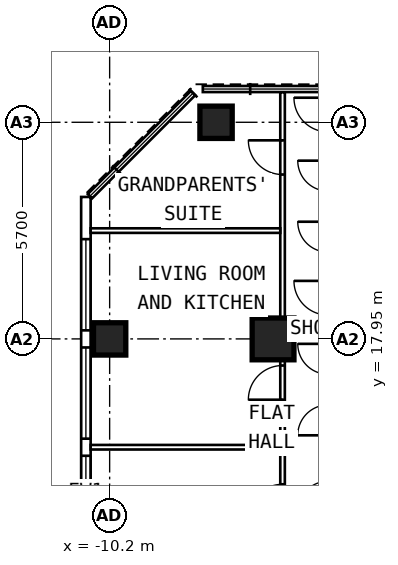
"""IFC4 building model, lengths in metres.
Left out: names, types, materials, properties, quantities, classifications, styles, units other than length and angle.
Written with IfcOpenShell. Run it as: python <this file> out.ifc"""

import sys

from ifc_helpers import new_model, si_unit, direction, frame, frame_2d, origin, origin_2d, place, context, subcontext, project, spatial, rectangle, extrude, element, fill, save


model = new_model("IFC4")
c1 = context("Model", 3, precision=1e-05, world=origin(), true_north=direction((0.0, 1.0)))
c2 = subcontext(c1, "Body", "Model", "MODEL_VIEW")
j1 = project(units=[si_unit("LENGTHUNIT", "METRE"), si_unit("PLANEANGLEUNIT", "RADIAN")], contexts=[c1])
p1 = place(None, origin())
s1 = spatial("IfcSite", under=j1, at=p1, CompositionType="ELEMENT")
p2 = place(p1, origin())
s2 = spatial("IfcBuilding", under=s1, at=p2, CompositionType="ELEMENT")
p3 = place(p2, frame((0.0, 0.0, 238.8)))
s3 = spatial("IfcBuildingStorey", under=s2, at=p3, CompositionType="ELEMENT", Elevation=238.8)
for number, where, z_axis, x_axis in (
    (1, (-10.2, 17.95, 0.0), (0.0, 0.0, 1.0), (0.0, 1.0, 0.0)),
    (2, (-7.4, 23.65, 0.0), (0.0, 0.0, 1.0), (0.0, 1.0, 0.0)),
):
    element("IfcColumn", number, at=place(p3, frame(where, z_axis=z_axis, x_axis=x_axis)), inside=s3, PredefinedType="COLUMN", context=c2, shape_type="SweptSolid", body=[
        extrude(rectangle(XDim=0.85, YDim=0.85, at=origin_2d()), origin(), (0.0, 0.0, 1.0), 3.6),
    ])
p4 = place(p3, frame((-5.9, 17.95, 0.0), z_axis=(0.0, 0.0, 1.0), x_axis=(0.0, 1.0, 0.0)))
e3 = element("IfcColumn", 3, at=p4, inside=s3, PredefinedType="COLUMN", context=c2, shape_type="SweptSolid", body=[
    extrude(rectangle(XDim=1.1, YDim=1.1, at=origin_2d()), origin(), (0.0, 0.0, 1.0), 3.6),
])
p5 = place(p3, frame((-10.825, 6.148, 0.0), z_axis=(0.0, 0.0, 1.0), x_axis=(0.0, 1.0, 0.0)))
e4 = element("IfcWall", 4, at=p5, inside=s3, PredefinedType="SOLIDWALL", context=c2, shape_type="SweptSolid", body=[
    extrude(rectangle(XDim=15.537, YDim=0.25, at=frame_2d((7.769, 0.0))), origin(), (0.0, 0.0, 1.0), 3.35),
])
p6 = place(p5, frame((0.627, 0.0, 0.8)))
e5 = element("IfcOpeningElement", 5, at=p6, cuts=e4, PredefinedType="OPENING", context=c2, shape_type="SweptSolid", body=[
    extrude(rectangle(XDim=2.4, YDim=1.8, at=frame_2d((1.2, 0.9))), frame((0.0, 0.137, 0.0), z_axis=(0.0, -1.0, 0.0), x_axis=(1.0, 0.0, 0.0)), (0.0, 0.0, 1.0), 0.274),
])
p7 = place(p5, frame((3.477, 0.0, 0.8)))
e6 = element("IfcOpeningElement", 6, at=p7, cuts=e4, PredefinedType="OPENING", context=c2, shape_type="SweptSolid", body=[
    extrude(rectangle(XDim=2.4, YDim=1.8, at=frame_2d((1.2, 0.9))), frame((0.0, 0.137, 0.0), z_axis=(0.0, -1.0, 0.0), x_axis=(1.0, 0.0, 0.0)), (0.0, 0.0, 1.0), 0.274),
])
p8 = place(p5, frame((6.327, 0.0, 0.8)))
e7 = element("IfcOpeningElement", 7, at=p8, cuts=e4, PredefinedType="OPENING", context=c2, shape_type="SweptSolid", body=[
    extrude(rectangle(XDim=2.4, YDim=1.8, at=frame_2d((1.2, 0.9))), frame((0.0, 0.137, 0.0), z_axis=(0.0, -1.0, 0.0), x_axis=(1.0, 0.0, 0.0)), (0.0, 0.0, 1.0), 0.274),
])
p9 = place(p5, frame((9.177, 0.0, 0.8)))
e8 = element("IfcOpeningElement", 8, at=p9, cuts=e4, PredefinedType="OPENING", context=c2, shape_type="SweptSolid", body=[
    extrude(rectangle(XDim=2.4, YDim=1.8, at=frame_2d((1.2, 0.9))), frame((0.0, 0.137, 0.0), z_axis=(0.0, -1.0, 0.0), x_axis=(1.0, 0.0, 0.0)), (0.0, 0.0, 1.0), 0.274),
])
p10 = place(p5, frame((12.027, 0.0, 0.8)))
e9 = element("IfcOpeningElement", 9, at=p10, cuts=e4, PredefinedType="OPENING", context=c2, shape_type="SweptSolid", body=[
    extrude(rectangle(XDim=2.4, YDim=1.8, at=frame_2d((1.2, 0.9))), frame((0.0, 0.137, 0.0), z_axis=(0.0, -1.0, 0.0), x_axis=(1.0, 0.0, 0.0)), (0.0, 0.0, 1.0), 0.274),
])
p11 = place(p3, frame((-5.65, 9.6, 0.0), z_axis=(0.0, 0.0, 1.0), x_axis=(0.0, 1.0, 0.0)))
e10 = element("IfcWall", 10, at=p11, inside=s3, PredefinedType="PARTITIONING", context=c2, shape_type="SweptSolid", body=[
    extrude(rectangle(XDim=14.845, YDim=0.12, at=frame_2d((7.422, 0.0))), origin(), (0.0, 0.0, 1.0), 3.35),
])
p12 = place(p11, frame((1.05, 0.0, 0.0)))
e11 = element("IfcOpeningElement", 11, at=p12, cuts=e10, PredefinedType="OPENING", context=c2, shape_type="SweptSolid", body=[
    extrude(rectangle(XDim=0.9, YDim=2.1, at=frame_2d((0.45, 1.05))), frame((0.0, 0.072, 0.0), z_axis=(0.0, -1.0, 0.0), x_axis=(1.0, 0.0, 0.0)), (0.0, 0.0, 1.0), 0.144),
])
p13 = place(p11, frame((3.625, 0.0, 0.0)))
e12 = element("IfcOpeningElement", 12, at=p13, cuts=e10, PredefinedType="OPENING", context=c2, shape_type="SweptSolid", body=[
    extrude(rectangle(XDim=0.9, YDim=2.1, at=frame_2d((0.45, 1.05))), frame((0.0, 0.072, 0.0), z_axis=(0.0, -1.0, 0.0), x_axis=(1.0, 0.0, 0.0)), (0.0, 0.0, 1.0), 0.144),
])
p14 = place(p11, frame((6.75, 0.0, 0.0)))
e13 = element("IfcOpeningElement", 13, at=p14, cuts=e10, PredefinedType="OPENING", context=c2, shape_type="SweptSolid", body=[
    extrude(rectangle(XDim=0.9, YDim=2.1, at=frame_2d((0.45, 1.05))), frame((0.0, 0.072, 0.0), z_axis=(0.0, -1.0, 0.0), x_axis=(1.0, 0.0, 0.0)), (0.0, 0.0, 1.0), 0.144),
])
p15 = place(p11, frame((12.675, 0.0, 0.0)))
e14 = element("IfcOpeningElement", 14, at=p15, cuts=e10, PredefinedType="OPENING", context=c2, shape_type="SweptSolid", body=[
    extrude(rectangle(XDim=0.9, YDim=2.1, at=frame_2d((0.45, 1.05))), frame((0.0, 0.072, 0.0), z_axis=(0.0, -1.0, 0.0), x_axis=(1.0, 0.0, 0.0)), (0.0, 0.0, 1.0), 0.144),
])
for number, where, z_axis, x_axis in (
    (15, (-5.71, 15.1, 0.0), (0.0, 0.0, 1.0), (-1.0, 0.0, 0.0)),
    (16, (-5.71, 20.8, 0.0), (0.0, 0.0, 1.0), (-1.0, 0.0, 0.0)),
):
    element("IfcWall", number, at=place(p3, frame(where, z_axis=z_axis, x_axis=x_axis)), inside=s3, PredefinedType="PARTITIONING", context=c2, shape_type="SweptSolid", body=[
        extrude(rectangle(XDim=4.99, YDim=0.12, at=frame_2d((2.495, 0.0))), origin(), (0.0, 0.0, 1.0), 3.35),
    ])
p16 = place(p8, origin())
e17 = element("IfcWindow", 17, at=p16, inside=s3, PartitioningType="SINGLE_PANEL", PredefinedType="WINDOW", context=c2, shape_type="SweptSolid", body=[
    extrude(rectangle(XDim=2.4, YDim=1.8, at=frame_2d((1.2, 0.9))), frame((0.0, 0.03, 0.0), z_axis=(0.0, -1.0, 0.0), x_axis=(1.0, 0.0, 0.0)), (0.0, 0.0, 1.0), 0.06),
])
fill(e7, e17)
p17 = place(p9, origin())
e18 = element("IfcWindow", 18, at=p17, inside=s3, PartitioningType="SINGLE_PANEL", PredefinedType="WINDOW", context=c2, shape_type="SweptSolid", body=[
    extrude(rectangle(XDim=2.4, YDim=1.8, at=frame_2d((1.2, 0.9))), frame((0.0, 0.03, 0.0), z_axis=(0.0, -1.0, 0.0), x_axis=(1.0, 0.0, 0.0)), (0.0, 0.0, 1.0), 0.06),
])
fill(e8, e18)
p18 = place(p10, origin())
e19 = element("IfcWindow", 19, at=p18, inside=s3, PartitioningType="SINGLE_PANEL", PredefinedType="WINDOW", context=c2, shape_type="SweptSolid", body=[
    extrude(rectangle(XDim=2.4, YDim=1.8, at=frame_2d((1.2, 0.9))), frame((0.0, 0.03, 0.0), z_axis=(0.0, -1.0, 0.0), x_axis=(1.0, 0.0, 0.0)), (0.0, 0.0, 1.0), 0.06),
])
fill(e9, e19)
p19 = place(p13, origin())
e20 = element("IfcDoor", 20, at=p19, inside=s3, OperationType="SINGLE_SWING_LEFT", PredefinedType="DOOR", context=c2, shape_type="SweptSolid", body=[
    extrude(rectangle(XDim=0.9, YDim=2.1, at=frame_2d((0.45, 1.05))), frame((0.0, 0.025, 0.0), z_axis=(0.0, -1.0, 0.0), x_axis=(1.0, 0.0, 0.0)), (0.0, 0.0, 1.0), 0.05),
])
fill(e12, e20)
p20 = place(p14, origin())
e21 = element("IfcDoor", 21, at=p20, inside=s3, OperationType="SINGLE_SWING_LEFT", PredefinedType="DOOR", context=c2, shape_type="SweptSolid", body=[
    extrude(rectangle(XDim=0.9, YDim=2.1, at=frame_2d((0.45, 1.05))), frame((0.0, 0.025, 0.0), z_axis=(0.0, -1.0, 0.0), x_axis=(1.0, 0.0, 0.0)), (0.0, 0.0, 1.0), 0.05),
])
fill(e13, e21)
p21 = place(p15, origin())
e22 = element("IfcDoor", 22, at=p21, inside=s3, OperationType="SINGLE_SWING_RIGHT", PredefinedType="DOOR", context=c2, shape_type="SweptSolid", body=[
    extrude(rectangle(XDim=0.9, YDim=2.1, at=frame_2d((0.45, 1.05))), frame((0.0, 0.025, 0.0), z_axis=(0.0, -1.0, 0.0), x_axis=(1.0, 0.0, 0.0)), (0.0, 0.0, 1.0), 0.05),
])
fill(e14, e22)
save(model, sys.argv[1])
